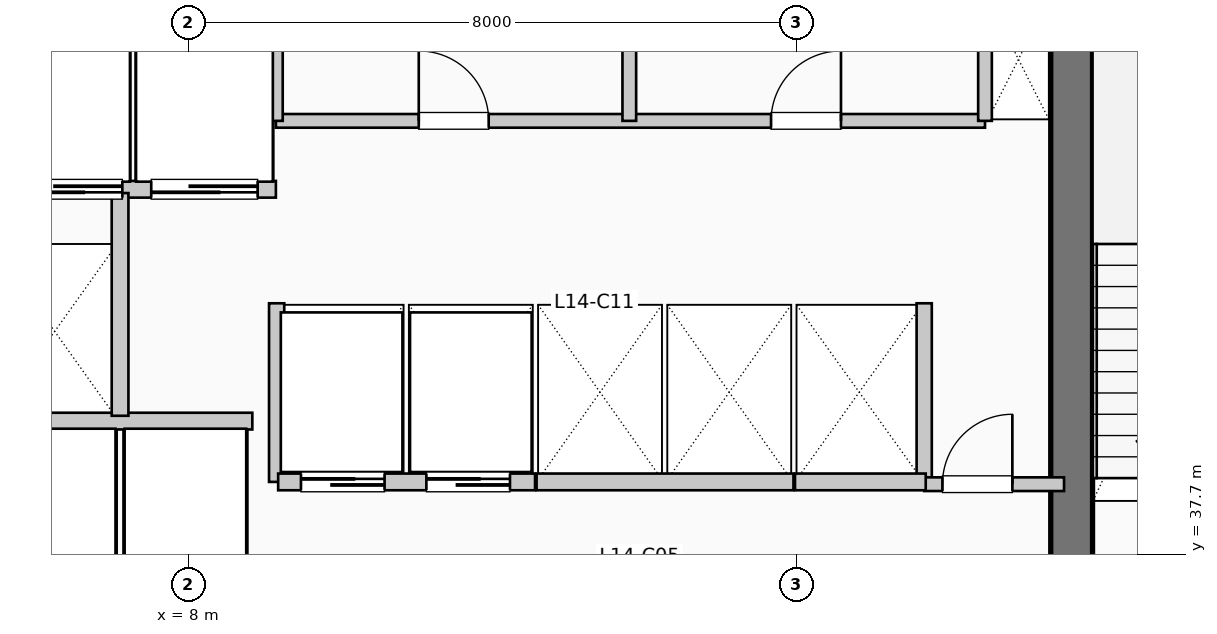
"""IFC4 building model, lengths in metres.
Left out: names, types, materials, properties, quantities, classifications, styles, units other than length and angle.
Written with IfcOpenShell. Run it as: python <this file> out.ifc"""

import sys

from ifc_helpers import new_model, si_unit, direction, frame, frame_2d, origin, place, context, subcontext, project, spatial, rectangle, extrude, element, fill, save


model = new_model("IFC4")
c1 = context("Model", 3, precision=1e-05, world=origin(), true_north=direction((0.0, 1.0)))
c2 = subcontext(c1, "Body", "Model", "MODEL_VIEW")
j1 = project(units=[si_unit("LENGTHUNIT", "METRE"), si_unit("PLANEANGLEUNIT", "RADIAN")], contexts=[c1])
p1 = place(None, origin())
s1 = spatial("IfcSite", under=j1, at=p1, CompositionType="ELEMENT")
p2 = place(p1, origin())
s2 = spatial("IfcBuilding", under=s1, at=p2, CompositionType="ELEMENT")
p3 = place(p2, frame((0.0, 0.0, 62.04)))
s3 = spatial("IfcBuildingStorey", under=s2, at=p3, CompositionType="ELEMENT", Elevation=62.04)
p4 = place(p3, frame((19.62, 37.15, 0.0), z_axis=(0.0, 0.0, 1.0), x_axis=(0.0, 1.0, 0.0)))
e1 = element("IfcWall", 1, at=p4, inside=s3, PredefinedType="SHEAR", context=c2, shape_type="SweptSolid", body=[
    extrude(rectangle(XDim=7.89, YDim=0.55, at=frame_2d((3.945, 0.0))), origin(), (0.0, 0.0, 1.0), 3.96),
])
p5 = place(p3, frame((5.38, 39.45, 0.0), z_axis=(0.0, 0.0, 1.0), x_axis=(1.0, 0.0, 0.0)))
e2 = element("IfcWall", 2, at=p5, inside=s3, PredefinedType="PARTITIONING", context=c2, shape_type="SweptSolid", body=[
    extrude(rectangle(XDim=3.46, YDim=0.22, at=frame_2d((1.73, 0.0))), origin(), (0.0, 0.0, 1.0), 3.71),
])
p6 = place(p3, frame((5.38, 42.5, 0.0), z_axis=(0.0, 0.0, 1.0), x_axis=(1.0, 0.0, 0.0)))
e3 = element("IfcWall", 3, at=p6, inside=s3, PredefinedType="PARTITIONING", context=c2, shape_type="SweptSolid", body=[
    extrude(rectangle(XDim=3.77, YDim=0.22, at=frame_2d((1.885, 0.0))), origin(), (0.0, 0.0, 1.0), 3.71),
])
p7 = place(p6, frame((1.75, 0.0, 0.0), z_axis=(0.0, 0.0, 1.0), x_axis=(-1.0, 0.0, 0.0)))
e4 = element("IfcOpeningElement", 4, at=p7, cuts=e3, PredefinedType="OPENING", context=c2, shape_type="SweptSolid", body=[
    extrude(rectangle(XDim=1.4, YDim=2.2, at=frame_2d((0.7, 1.1))), frame((0.0, 0.12, 0.0), z_axis=(0.0, -1.0, 0.0), x_axis=(1.0, 0.0, 0.0)), (0.0, 0.0, 1.0), 0.24),
])
p8 = place(p6, frame((3.53, 0.0, 0.0), z_axis=(0.0, 0.0, 1.0), x_axis=(-1.0, 0.0, 0.0)))
e5 = element("IfcOpeningElement", 5, at=p8, cuts=e3, PredefinedType="OPENING", context=c2, shape_type="SweptSolid", body=[
    extrude(rectangle(XDim=1.4, YDim=2.2, at=frame_2d((0.7, 1.1))), frame((0.0, 0.12, 0.0), z_axis=(0.0, -1.0, 0.0), x_axis=(1.0, 0.0, 0.0)), (0.0, 0.0, 1.0), 0.24),
])
p9 = place(p3, frame((7.1, 39.52, 0.0), z_axis=(0.0, 0.0, 1.0), x_axis=(0.0, 1.0, 0.0)))
e6 = element("IfcWall", 6, at=p9, inside=s3, PredefinedType="PARTITIONING", context=c2, shape_type="SweptSolid", body=[
    extrude(rectangle(XDim=2.93, YDim=0.22, at=frame_2d((1.465, 0.0))), origin(), (0.0, 0.0, 1.0), 3.71),
])
for number, where, z_axis, x_axis in (
    (7, (9.16, 38.65, 0.0), (0.0, 0.0, 1.0), (0.0, 1.0, 0.0)),
    (8, (17.68, 38.65, 0.0), (0.0, 0.0, 1.0), (0.0, 1.0, 0.0)),
):
    element("IfcWall", number, at=place(p3, frame(where, z_axis=z_axis, x_axis=x_axis)), inside=s3, PredefinedType="PARTITIONING", context=c2, shape_type="SweptSolid", body=[
        extrude(rectangle(XDim=2.35, YDim=0.2, at=frame_2d((1.175, 0.0))), origin(), (0.0, 0.0, 1.0), 3.71),
    ])
p10 = place(p3, frame((17.68, 38.62, 0.0), z_axis=(0.0, 0.0, 1.0), x_axis=(1.0, 0.0, 0.0)))
e9 = element("IfcWall", 9, at=p10, inside=s3, PredefinedType="PARTITIONING", context=c2, shape_type="SweptSolid", body=[
    extrude(rectangle(XDim=1.84, YDim=0.18, at=frame_2d((0.92, 0.0))), origin(), (0.0, 0.0, 1.0), 3.71),
])
p11 = place(p10, frame((0.24, 0.0, 0.0)))
e10 = element("IfcOpeningElement", 10, at=p11, cuts=e9, PredefinedType="OPENING", context=c2, shape_type="SweptSolid", body=[
    extrude(rectangle(XDim=0.92, YDim=2.1, at=frame_2d((0.46, 1.05))), frame((0.0, 0.1, 0.0), z_axis=(0.0, -1.0, 0.0), x_axis=(1.0, 0.0, 0.0)), (0.0, 0.0, 1.0), 0.2),
])
p12 = place(p3, frame((9.18, 38.65, 0.0), z_axis=(0.0, 0.0, 1.0), x_axis=(1.0, 0.0, 0.0)))
e11 = element("IfcWall", 11, at=p12, inside=s3, PredefinedType="PARTITIONING", context=c2, shape_type="SweptSolid", body=[
    extrude(rectangle(XDim=3.38, YDim=0.22, at=frame_2d((1.69, 0.0))), origin(), (0.0, 0.0, 1.0), 3.71),
])
p13 = place(p12, frame((0.3, 0.0, 0.0)))
e12 = element("IfcOpeningElement", 12, at=p13, cuts=e11, PredefinedType="OPENING", context=c2, shape_type="SweptSolid", body=[
    extrude(rectangle(XDim=1.1, YDim=2.2, at=frame_2d((0.55, 1.1))), frame((0.0, 0.12, 0.0), z_axis=(0.0, -1.0, 0.0), x_axis=(1.0, 0.0, 0.0)), (0.0, 0.0, 1.0), 0.24),
])
p14 = place(p12, frame((1.95, 0.0, 0.0)))
e13 = element("IfcOpeningElement", 13, at=p14, cuts=e11, PredefinedType="OPENING", context=c2, shape_type="SweptSolid", body=[
    extrude(rectangle(XDim=1.1, YDim=2.2, at=frame_2d((0.55, 1.1))), frame((0.0, 0.12, 0.0), z_axis=(0.0, -1.0, 0.0), x_axis=(1.0, 0.0, 0.0)), (0.0, 0.0, 1.0), 0.24),
])
p15 = place(p3, frame((12.58, 38.65, 0.0), z_axis=(0.0, 0.0, 1.0), x_axis=(1.0, 0.0, 0.0)))
e14 = element("IfcWall", 14, at=p15, inside=s3, PredefinedType="PARTITIONING", context=c2, shape_type="SweptSolid", body=[
    extrude(rectangle(XDim=3.38, YDim=0.22, at=frame_2d((1.69, 0.0))), origin(), (0.0, 0.0, 1.0), 3.71),
])
p16 = place(p3, frame((15.98, 38.65, 0.0), z_axis=(0.0, 0.0, 1.0), x_axis=(1.0, 0.0, 0.0)))
e15 = element("IfcWall", 15, at=p16, inside=s3, PredefinedType="PARTITIONING", context=c2, shape_type="SweptSolid", body=[
    extrude(rectangle(XDim=1.72, YDim=0.22, at=frame_2d((0.86, 0.0))), origin(), (0.0, 0.0, 1.0), 3.71),
])
p17 = place(p3, frame((9.15, 43.4, 0.0), z_axis=(0.0, 0.0, 1.0), x_axis=(1.0, 0.0, 0.0)))
e16 = element("IfcWall", 16, at=p17, inside=s3, PredefinedType="PLUMBINGWALL", context=c2, shape_type="SweptSolid", body=[
    extrude(rectangle(XDim=9.33, YDim=0.18, at=frame_2d((4.665, 0.0))), origin(), (0.0, 0.0, 1.0), 3.71),
])
p18 = place(p17, frame((1.88, 0.0, 0.0)))
e17 = element("IfcOpeningElement", 17, at=p18, cuts=e16, PredefinedType="OPENING", context=c2, shape_type="SweptSolid", body=[
    extrude(rectangle(XDim=0.92, YDim=2.1, at=frame_2d((0.46, 1.05))), frame((0.0, 0.1, 0.0), z_axis=(0.0, -1.0, 0.0), x_axis=(1.0, 0.0, 0.0)), (0.0, 0.0, 1.0), 0.2),
])
p19 = place(p17, frame((6.515, 0.0, 0.0)))
e18 = element("IfcOpeningElement", 18, at=p19, cuts=e16, PredefinedType="OPENING", context=c2, shape_type="SweptSolid", body=[
    extrude(rectangle(XDim=0.92, YDim=2.1, at=frame_2d((0.46, 1.05))), frame((0.0, 0.1, 0.0), z_axis=(0.0, -1.0, 0.0), x_axis=(1.0, 0.0, 0.0)), (0.0, 0.0, 1.0), 0.2),
])
for number, where, z_axis, x_axis in (
    (19, (9.15, 43.4, 0.0), (0.0, 0.0, 1.0), (0.0, 1.0, 0.0)),
    (20, (18.48, 43.4, 0.0), (0.0, 0.0, 1.0), (0.0, 1.0, 0.0)),
    (21, (13.8, 43.4, 0.0), (0.0, 0.0, 1.0), (0.0, 1.0, 0.0)),
):
    element("IfcWall", number, at=place(p3, frame(where, z_axis=z_axis, x_axis=x_axis)), inside=s3, PredefinedType="PLUMBINGWALL", context=c2, shape_type="SweptSolid", body=[
        extrude(rectangle(XDim=1.88, YDim=0.18, at=frame_2d((0.94, 0.0))), origin(), (0.0, 0.0, 1.0), 3.71),
    ])
p20 = place(p7, origin())
e22 = element("IfcDoor", 22, at=p20, inside=s3, OperationType="SLIDING_TO_LEFT", PredefinedType="DOOR", context=c2, shape_type="SweptSolid", body=[
    extrude(rectangle(XDim=1.4, YDim=2.2, at=frame_2d((0.7, 1.1))), frame((0.0, 0.025, 0.0), z_axis=(0.0, -1.0, 0.0), x_axis=(1.0, 0.0, 0.0)), (0.0, 0.0, 1.0), 0.05),
])
fill(e4, e22)
p21 = place(p8, origin())
e23 = element("IfcDoor", 23, at=p21, inside=s3, OperationType="SLIDING_TO_LEFT", PredefinedType="DOOR", context=c2, shape_type="SweptSolid", body=[
    extrude(rectangle(XDim=1.4, YDim=2.2, at=frame_2d((0.7, 1.1))), frame((0.0, 0.025, 0.0), z_axis=(0.0, -1.0, 0.0), x_axis=(1.0, 0.0, 0.0)), (0.0, 0.0, 1.0), 0.05),
])
fill(e5, e23)
p22 = place(p11, origin())
e24 = element("IfcDoor", 24, at=p22, inside=s3, OperationType="SINGLE_SWING_RIGHT", PredefinedType="DOOR", context=c2, shape_type="SweptSolid", body=[
    extrude(rectangle(XDim=0.92, YDim=2.1, at=frame_2d((0.46, 1.05))), frame((0.0, 0.025, 0.0), z_axis=(0.0, -1.0, 0.0), x_axis=(1.0, 0.0, 0.0)), (0.0, 0.0, 1.0), 0.05),
])
fill(e10, e24)
p23 = place(p13, origin())
e25 = element("IfcDoor", 25, at=p23, inside=s3, OperationType="SLIDING_TO_LEFT", PredefinedType="DOOR", context=c2, shape_type="SweptSolid", body=[
    extrude(rectangle(XDim=1.1, YDim=2.2, at=frame_2d((0.55, 1.1))), frame((0.0, 0.025, 0.0), z_axis=(0.0, -1.0, 0.0), x_axis=(1.0, 0.0, 0.0)), (0.0, 0.0, 1.0), 0.05),
])
fill(e12, e25)
p24 = place(p14, origin())
e26 = element("IfcDoor", 26, at=p24, inside=s3, OperationType="SLIDING_TO_LEFT", PredefinedType="DOOR", context=c2, shape_type="SweptSolid", body=[
    extrude(rectangle(XDim=1.1, YDim=2.2, at=frame_2d((0.55, 1.1))), frame((0.0, 0.025, 0.0), z_axis=(0.0, -1.0, 0.0), x_axis=(1.0, 0.0, 0.0)), (0.0, 0.0, 1.0), 0.05),
])
fill(e13, e26)
p25 = place(p18, origin())
e27 = element("IfcDoor", 27, at=p25, inside=s3, OperationType="SINGLE_SWING_LEFT", PredefinedType="DOOR", context=c2, shape_type="SweptSolid", body=[
    extrude(rectangle(XDim=0.92, YDim=2.1, at=frame_2d((0.46, 1.05))), frame((0.0, 0.025, 0.0), z_axis=(0.0, -1.0, 0.0), x_axis=(1.0, 0.0, 0.0)), (0.0, 0.0, 1.0), 0.05),
])
fill(e17, e27)
p26 = place(p19, origin())
e28 = element("IfcDoor", 28, at=p26, inside=s3, OperationType="SINGLE_SWING_RIGHT", PredefinedType="DOOR", context=c2, shape_type="SweptSolid", body=[
    extrude(rectangle(XDim=0.92, YDim=2.1, at=frame_2d((0.46, 1.05))), frame((0.0, 0.025, 0.0), z_axis=(0.0, -1.0, 0.0), x_axis=(1.0, 0.0, 0.0)), (0.0, 0.0, 1.0), 0.05),
])
fill(e18, e28)
save(model, sys.argv[1])
